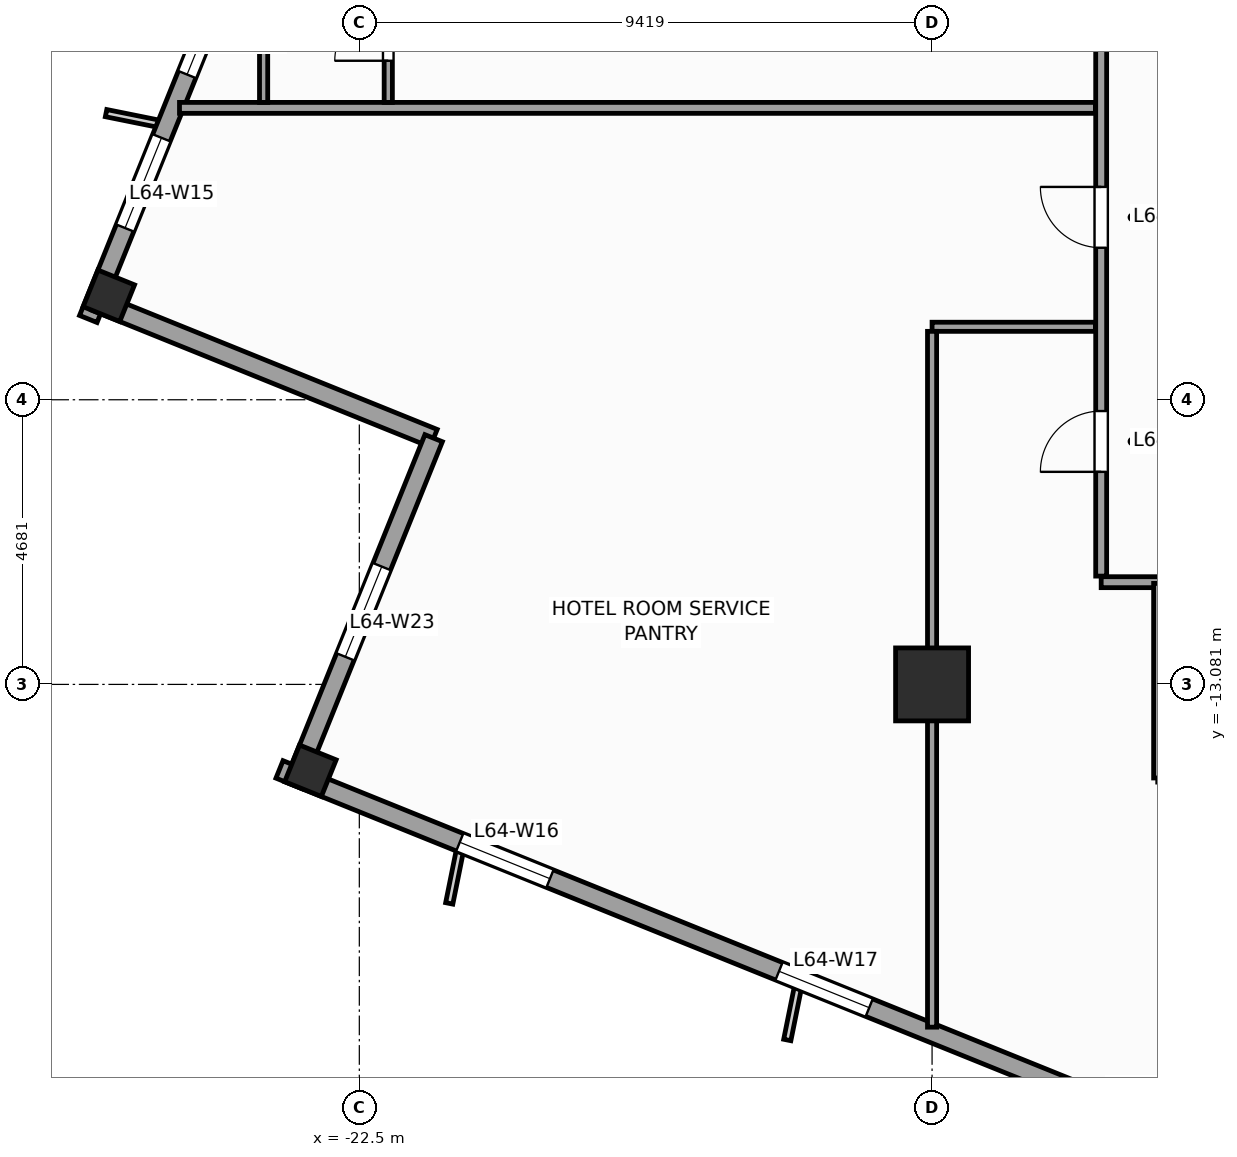
"""IFC4 building model, lengths in metres.
Left out: names, types, materials, properties, quantities, classifications, styles, units other than length and angle.
Written with IfcOpenShell. Run it as: python <this file> out.ifc"""

import sys

from ifc_helpers import new_model, si_unit, direction, frame, frame_2d, origin, origin_2d, place, context, subcontext, project, spatial, rectangle, extrude, source, transform, mapped, element, fill, save


model = new_model("IFC4")
c1 = context("Model", 3, precision=1e-05, world=origin(), true_north=direction((0.0, 1.0)))
c2 = subcontext(c1, "Body", "Model", "MODEL_VIEW")
j1 = project(units=[si_unit("LENGTHUNIT", "METRE"), si_unit("PLANEANGLEUNIT", "RADIAN")], contexts=[c1])
p1 = place(None, origin())
s1 = spatial("IfcSite", under=j1, at=p1, CompositionType="ELEMENT")
p2 = place(p1, origin())
s2 = spatial("IfcBuilding", under=s1, at=p2, CompositionType="ELEMENT")
p3 = place(p2, frame((0.0, 0.0, 265.2)))
s3 = spatial("IfcBuildingStorey", under=s2, at=p3, CompositionType="ELEMENT", Elevation=265.2)
m1 = source(origin(), c2, "Body", "SweptSolid", [
    extrude(rectangle(XDim=1.2, YDim=1.2, at=origin_2d()), origin(), (0.0, 0.0, 1.0), 3.6),
])
p4 = place(p3, frame((-13.081, -13.081, 0.0), z_axis=(0.0, 0.0, 1.0), x_axis=(1.0, 0.0, 0.0)))
e1 = element("IfcColumn", 1, at=p4, inside=s3, PredefinedType="COLUMN", context=c2, shape_type="MappedRepresentation", body=[
    mapped(m1, transform((0.0, 0.0, 0.0), scale=1.0)),
])
m2 = source(origin(), c2, "Body", "SweptSolid", [
    extrude(rectangle(XDim=0.65, YDim=0.65, at=origin_2d()), origin(), (0.0, 0.0, 1.0), 3.6),
])
for number, where, z_axis, x_axis in (
    (2, (-26.62, -6.69, 0.0), (0.0, 0.0, 1.0), (0.375, 0.927, 0.0)),
    (3, (-23.304, -14.501, 0.0), (0.0, 0.0, 1.0), (0.375, 0.927, 0.0)),
):
    element("IfcColumn", number, at=place(p3, frame(where, z_axis=z_axis, x_axis=x_axis)), inside=s3, PredefinedType="COLUMN", context=c2, shape_type="MappedRepresentation", body=[
        mapped(m2, transform((0.0, 0.0, 0.0), scale=1.0)),
    ])
p5 = place(p3, frame((-14.479, 23.813, 0.0), z_axis=(0.0, 0.0, 1.0), x_axis=(-0.374609557019, -0.927182657188, 0.0)))
e4 = element("IfcWall", 4, at=p5, inside=s3, PredefinedType="STANDARD", context=c2, shape_type="SweptSolid", body=[
    extrude(rectangle(XDim=33.31, YDim=0.31, at=frame_2d((16.655, 0.0))), origin(), (0.0, 0.0, 1.0), 2.75),
])
p6 = place(p5, frame((3.197, 0.0, 0.47)))
e5 = element("IfcOpeningElement", 5, at=p6, cuts=e4, PredefinedType="OPENING", context=c2, shape_type="SweptSolid", body=[
    extrude(rectangle(XDim=1.6, YDim=2.1, at=frame_2d((0.8, 1.05))), frame((0.0, 0.165, 0.0), z_axis=(0.0, -1.0, 0.0), x_axis=(1.0, 0.0, 0.0)), (0.0, 0.0, 1.0), 0.33),
])
p7 = place(p5, frame((8.86, 0.0, 0.47)))
e6 = element("IfcOpeningElement", 6, at=p7, cuts=e4, PredefinedType="OPENING", context=c2, shape_type="SweptSolid", body=[
    extrude(rectangle(XDim=1.6, YDim=2.1, at=frame_2d((0.8, 1.05))), frame((0.0, 0.165, 0.0), z_axis=(0.0, -1.0, 0.0), x_axis=(1.0, 0.0, 0.0)), (0.0, 0.0, 1.0), 0.33),
])
p8 = place(p5, frame((14.439, 0.0, 0.47)))
e7 = element("IfcOpeningElement", 7, at=p8, cuts=e4, PredefinedType="OPENING", context=c2, shape_type="SweptSolid", body=[
    extrude(rectangle(XDim=1.6, YDim=2.1, at=frame_2d((0.8, 1.05))), frame((0.0, 0.165, 0.0), z_axis=(0.0, -1.0, 0.0), x_axis=(1.0, 0.0, 0.0)), (0.0, 0.0, 1.0), 0.33),
])
p9 = place(p5, frame((21.851, 0.0, 0.47)))
e8 = element("IfcOpeningElement", 8, at=p9, cuts=e4, PredefinedType="OPENING", context=c2, shape_type="SweptSolid", body=[
    extrude(rectangle(XDim=1.6, YDim=2.1, at=frame_2d((0.8, 1.05))), frame((0.0, 0.165, 0.0), z_axis=(0.0, -1.0, 0.0), x_axis=(1.0, 0.0, 0.0)), (0.0, 0.0, 1.0), 0.33),
])
p10 = place(p5, frame((30.097, 0.0, 0.47)))
e9 = element("IfcOpeningElement", 9, at=p10, cuts=e4, PredefinedType="OPENING", context=c2, shape_type="SweptSolid", body=[
    extrude(rectangle(XDim=1.6, YDim=2.1, at=frame_2d((0.8, 1.05))), frame((0.0, 0.165, 0.0), z_axis=(0.0, -1.0, 0.0), x_axis=(1.0, 0.0, 0.0)), (0.0, 0.0, 1.0), 0.33),
])
p11 = place(p5, frame((27.374, 0.0, 0.47)))
e10 = element("IfcOpeningElement", 10, at=p11, cuts=e4, PredefinedType="OPENING", context=c2, shape_type="SweptSolid", body=[
    extrude(rectangle(XDim=1.6, YDim=2.1, at=frame_2d((0.8, 1.05))), frame((0.0, 0.165, 0.0), z_axis=(0.0, -1.0, 0.0), x_axis=(1.0, 0.0, 0.0)), (0.0, 0.0, 1.0), 0.33),
])
p12 = place(p3, frame((-26.841, -6.784, 0.0), z_axis=(0.0, 0.0, 1.0), x_axis=(0.927171722085, -0.374636620962, 0.0)))
e11 = element("IfcWall", 11, at=p12, inside=s3, PredefinedType="STANDARD", context=c2, shape_type="SweptSolid", body=[
    extrude(rectangle(XDim=6.0, YDim=0.31, at=frame_2d((3.0, 0.0))), origin(), (0.0, 0.0, 1.0), 2.65),
])
p13 = place(p3, frame((-21.278, -9.032, 0.0), z_axis=(0.0, 0.0, 1.0), x_axis=(-0.374602739196, -0.927185411764, 0.0)))
e12 = element("IfcWall", 12, at=p13, inside=s3, PredefinedType="STANDARD", context=c2, shape_type="SweptSolid", body=[
    extrude(rectangle(XDim=6.155, YDim=0.31, at=frame_2d((3.078, 0.0))), origin(), (0.0, 0.0, 1.0), 3.35),
])
p14 = place(p13, frame((2.278, 0.0, 0.47)))
e13 = element("IfcOpeningElement", 13, at=p14, cuts=e12, PredefinedType="OPENING", context=c2, shape_type="SweptSolid", body=[
    extrude(rectangle(XDim=1.6, YDim=2.1, at=frame_2d((0.8, 1.05))), frame((0.0, 0.165, 0.0), z_axis=(0.0, -1.0, 0.0), x_axis=(1.0, 0.0, 0.0)), (0.0, 0.0, 1.0), 0.33),
])
p15 = place(p3, frame((-23.813, -14.479, 0.0), z_axis=(0.0, 0.0, 1.0), x_axis=(0.927182657188, -0.374609557019, 0.0)))
e14 = element("IfcWall", 14, at=p15, inside=s3, PredefinedType="STANDARD", context=c2, shape_type="SweptSolid", body=[
    extrude(rectangle(XDim=33.31, YDim=0.31, at=frame_2d((16.655, 0.0))), origin(), (0.0, 0.0, 1.0), 2.75),
])
p16 = place(p15, frame((22.58, 0.0, 0.0)))
e15 = element("IfcOpeningElement", 15, at=p16, cuts=e14, PredefinedType="OPENING", context=c2, shape_type="SweptSolid", body=[
    extrude(rectangle(XDim=1.05, YDim=2.25, at=frame_2d((0.525, 1.125))), frame((0.0, 0.165, 0.0), z_axis=(0.0, -1.0, 0.0), x_axis=(1.0, 0.0, 0.0)), (0.0, 0.0, 1.0), 0.33),
])
p17 = place(p15, frame((3.197, 0.0, 0.47)))
e16 = element("IfcOpeningElement", 16, at=p17, cuts=e14, PredefinedType="OPENING", context=c2, shape_type="SweptSolid", body=[
    extrude(rectangle(XDim=1.6, YDim=2.1, at=frame_2d((0.8, 1.05))), frame((0.0, 0.165, 0.0), z_axis=(0.0, -1.0, 0.0), x_axis=(1.0, 0.0, 0.0)), (0.0, 0.0, 1.0), 0.33),
])
p18 = place(p15, frame((8.86, 0.0, 0.47)))
e17 = element("IfcOpeningElement", 17, at=p18, cuts=e14, PredefinedType="OPENING", context=c2, shape_type="SweptSolid", body=[
    extrude(rectangle(XDim=1.6, YDim=2.1, at=frame_2d((0.8, 1.05))), frame((0.0, 0.165, 0.0), z_axis=(0.0, -1.0, 0.0), x_axis=(1.0, 0.0, 0.0)), (0.0, 0.0, 1.0), 0.33),
])
p19 = place(p15, frame((14.439, 0.0, 0.47)))
e18 = element("IfcOpeningElement", 18, at=p19, cuts=e14, PredefinedType="OPENING", context=c2, shape_type="SweptSolid", body=[
    extrude(rectangle(XDim=1.6, YDim=2.1, at=frame_2d((0.8, 1.05))), frame((0.0, 0.165, 0.0), z_axis=(0.0, -1.0, 0.0), x_axis=(1.0, 0.0, 0.0)), (0.0, 0.0, 1.0), 0.33),
])
p20 = place(p15, frame((19.601, 0.0, 0.47)))
e19 = element("IfcOpeningElement", 19, at=p20, cuts=e14, PredefinedType="OPENING", context=c2, shape_type="SweptSolid", body=[
    extrude(rectangle(XDim=1.6, YDim=2.1, at=frame_2d((0.8, 1.05))), frame((0.0, 0.165, 0.0), z_axis=(0.0, -1.0, 0.0), x_axis=(1.0, 0.0, 0.0)), (0.0, 0.0, 1.0), 0.33),
])
p21 = place(p15, frame((27.097, 0.0, 0.47)))
e20 = element("IfcOpeningElement", 20, at=p21, cuts=e14, PredefinedType="OPENING", context=c2, shape_type="SweptSolid", body=[
    extrude(rectangle(XDim=1.6, YDim=2.1, at=frame_2d((0.8, 1.05))), frame((0.0, 0.165, 0.0), z_axis=(0.0, -1.0, 0.0), x_axis=(1.0, 0.0, 0.0)), (0.0, 0.0, 1.0), 0.33),
])
p22 = place(p3, frame((-10.3, -11.4, 0.0), z_axis=(0.0, 0.0, 1.0), x_axis=(1.0, 0.0, 0.0)))
e21 = element("IfcWall", 21, at=p22, inside=s3, PredefinedType="PARTITIONING", context=c2, shape_type="SweptSolid", body=[
    extrude(rectangle(XDim=21.7, YDim=0.18, at=frame_2d((10.85, 0.0))), origin(), (0.0, 0.0, 1.0), 3.35),
])
p23 = place(p22, frame((1.605, 0.0, 0.0)))
e22 = element("IfcOpeningElement", 22, at=p23, cuts=e21, PredefinedType="OPENING", context=c2, shape_type="SweptSolid", body=[
    extrude(rectangle(XDim=0.95, YDim=2.1, at=frame_2d((0.475, 1.05))), frame((0.0, 0.1, 0.0), z_axis=(0.0, -1.0, 0.0), x_axis=(1.0, 0.0, 0.0)), (0.0, 0.0, 1.0), 0.2),
])
p24 = place(p22, frame((17.236, 0.0, 0.0)))
e23 = element("IfcOpeningElement", 23, at=p24, cuts=e21, PredefinedType="OPENING", context=c2, shape_type="SweptSolid", body=[
    extrude(rectangle(XDim=1.0, YDim=2.15, at=frame_2d((0.5, 1.075))), frame((0.0, 0.1, 0.0), z_axis=(0.0, -1.0, 0.0), x_axis=(1.0, 0.0, 0.0)), (0.0, 0.0, 1.0), 0.2),
])
p25 = place(p22, frame((9.8, 0.0, 0.0)))
e24 = element("IfcOpeningElement", 24, at=p25, cuts=e21, PredefinedType="OPENING", context=c2, shape_type="SweptSolid", body=[
    extrude(rectangle(XDim=1.0, YDim=2.15, at=frame_2d((0.5, 1.075))), frame((0.0, 0.1, 0.0), z_axis=(0.0, -1.0, 0.0), x_axis=(1.0, 0.0, 0.0)), (0.0, 0.0, 1.0), 0.2),
])
p26 = place(p3, frame((-10.3, -11.3, 0.0), z_axis=(0.0, 0.0, 1.0), x_axis=(0.0, 1.0, 0.0)))
e25 = element("IfcWall", 25, at=p26, inside=s3, PredefinedType="PARTITIONING", context=c2, shape_type="SweptSolid", body=[
    extrude(rectangle(XDim=21.5, YDim=0.18, at=frame_2d((10.75, 0.0))), origin(), (0.0, 0.0, 1.0), 3.35),
])
p27 = place(p26, frame((12.9, 0.0, 0.0)))
e26 = element("IfcOpeningElement", 26, at=p27, cuts=e25, PredefinedType="OPENING", context=c2, shape_type="SweptSolid", body=[
    extrude(rectangle(XDim=1.0, YDim=2.15, at=frame_2d((0.5, 1.075))), frame((0.0, 0.1, 0.0), z_axis=(0.0, -1.0, 0.0), x_axis=(1.0, 0.0, 0.0)), (0.0, 0.0, 1.0), 0.2),
])
p28 = place(p26, frame((17.736, 0.0, 0.0)))
e27 = element("IfcOpeningElement", 27, at=p28, cuts=e25, PredefinedType="OPENING", context=c2, shape_type="SweptSolid", body=[
    extrude(rectangle(XDim=1.0, YDim=2.15, at=frame_2d((0.5, 1.075))), frame((0.0, 0.1, 0.0), z_axis=(0.0, -1.0, 0.0), x_axis=(1.0, 0.0, 0.0)), (0.0, 0.0, 1.0), 0.2),
])
p29 = place(p26, frame((1.714, 0.0, 0.0)))
e28 = element("IfcOpeningElement", 28, at=p29, cuts=e25, PredefinedType="OPENING", context=c2, shape_type="SweptSolid", body=[
    extrude(rectangle(XDim=1.0, YDim=2.15, at=frame_2d((0.5, 1.075))), frame((0.0, 0.1, 0.0), z_axis=(0.0, -1.0, 0.0), x_axis=(1.0, 0.0, 0.0)), (0.0, 0.0, 1.0), 0.2),
])
p30 = place(p26, frame((5.4, 0.0, 0.0)))
e29 = element("IfcOpeningElement", 29, at=p30, cuts=e25, PredefinedType="OPENING", context=c2, shape_type="SweptSolid", body=[
    extrude(rectangle(XDim=1.0, YDim=2.15, at=frame_2d((0.5, 1.075))), frame((0.0, 0.1, 0.0), z_axis=(0.0, -1.0, 0.0), x_axis=(1.0, 0.0, 0.0)), (0.0, 0.0, 1.0), 0.2),
])
p31 = place(p26, frame((9.1, 0.0, 0.0)))
e30 = element("IfcOpeningElement", 30, at=p31, cuts=e25, PredefinedType="OPENING", context=c2, shape_type="SweptSolid", body=[
    extrude(rectangle(XDim=1.0, YDim=2.15, at=frame_2d((0.5, 1.075))), frame((0.0, 0.1, 0.0), z_axis=(0.0, -1.0, 0.0), x_axis=(1.0, 0.0, 0.0)), (0.0, 0.0, 1.0), 0.2),
])
p32 = place(p3, frame((-10.395, -3.6, 0.0), z_axis=(0.0, 0.0, 1.0), x_axis=(-1.0, 0.0, 0.0)))
e31 = element("IfcWall", 31, at=p32, inside=s3, PredefinedType="PARTITIONING", context=c2, shape_type="SweptSolid", body=[
    extrude(rectangle(XDim=15.062, YDim=0.18, at=frame_2d((7.531, 0.0))), origin(), (0.0, 0.0, 1.0), 3.02),
])
p33 = place(p3, frame((-10.395, -7.2, 0.0), z_axis=(0.0, 0.0, 1.0), x_axis=(-1.0, 0.0, 0.0)))
e32 = element("IfcWall", 32, at=p33, inside=s3, PredefinedType="PARTITIONING", context=c2, shape_type="SweptSolid", body=[
    extrude(rectangle(XDim=2.686, YDim=0.15, at=frame_2d((1.343, 0.0))), origin(), (0.0, 0.0, 1.0), 3.35),
])
p34 = place(p3, frame((-13.081, -7.275, 0.0), z_axis=(0.0, 0.0, 1.0), x_axis=(0.0, -1.0, 0.0)))
e33 = element("IfcWall", 33, at=p34, inside=s3, PredefinedType="PARTITIONING", context=c2, shape_type="SweptSolid", body=[
    extrude(rectangle(XDim=11.443, YDim=0.15, at=frame_2d((5.721, 0.0))), origin(), (0.0, 0.0, 1.0), 2.45),
])
p35 = place(p3, frame((-9.37, -14.62, 0.0), z_axis=(0.0, 0.0, 1.0), x_axis=(0.0, 1.0, 0.0)))
e34 = element("IfcWall", 34, at=p35, inside=s3, PredefinedType="PARTITIONING", context=c2, shape_type="SweptSolid", body=[
    extrude(rectangle(XDim=3.2, YDim=0.135, at=frame_2d((1.6, 0.0))), origin(), (0.0, 0.0, 1.0), 3.35),
])
p36 = place(p3, frame((-22.024, -3.51, 0.0), z_axis=(0.0, 0.0, 1.0), x_axis=(0.0, 1.0, 0.0)))
e35 = element("IfcWall", 35, at=p36, inside=s3, PredefinedType="PARTITIONING", context=c2, shape_type="SweptSolid", body=[
    extrude(rectangle(XDim=2.25, YDim=0.135, at=frame_2d((1.125, 0.0))), origin(), (0.0, 0.0, 1.0), 3.35),
])
p37 = place(p36, frame((0.685, 0.0, 0.0)))
e36 = element("IfcOpeningElement", 36, at=p37, cuts=e35, PredefinedType="OPENING", context=c2, shape_type="SweptSolid", body=[
    extrude(rectangle(XDim=0.88, YDim=2.1, at=frame_2d((0.44, 1.05))), frame((0.0, 0.078, 0.0), z_axis=(0.0, -1.0, 0.0), x_axis=(1.0, 0.0, 0.0)), (0.0, 0.0, 1.0), 0.155),
])
p38 = place(p3, frame((-24.074, -3.51, 0.0), z_axis=(0.0, 0.0, 1.0), x_axis=(0.0, 1.0, 0.0)))
e37 = element("IfcWall", 37, at=p38, inside=s3, PredefinedType="PARTITIONING", context=c2, shape_type="SweptSolid", body=[
    extrude(rectangle(XDim=2.25, YDim=0.135, at=frame_2d((1.125, 0.0))), origin(), (0.0, 0.0, 1.0), 3.35),
])
m3 = source(origin(), c2, "Body", "SweptSolid", [
    extrude(rectangle(XDim=1.6, YDim=2.1, at=frame_2d((0.8, 1.05))), frame((0.0, 0.03, 0.0), z_axis=(0.0, -1.0, 0.0), x_axis=(1.0, 0.0, 0.0)), (0.0, 0.0, 1.0), 0.06),
])
p39 = place(p10, origin())
e38 = element("IfcWindow", 38, at=p39, inside=s3, PartitioningType="SINGLE_PANEL", PredefinedType="WINDOW", context=c2, shape_type="MappedRepresentation", body=[
    mapped(m3, transform((0.0, 0.0, 0.0), scale=1.0)),
])
fill(e9, e38)
p40 = place(p17, origin())
e39 = element("IfcWindow", 39, at=p40, inside=s3, PartitioningType="SINGLE_PANEL", PredefinedType="WINDOW", context=c2, shape_type="MappedRepresentation", body=[
    mapped(m3, transform((0.0, 0.0, 0.0), scale=1.0)),
])
fill(e16, e39)
p41 = place(p18, origin())
e40 = element("IfcWindow", 40, at=p41, inside=s3, PartitioningType="SINGLE_PANEL", PredefinedType="WINDOW", context=c2, shape_type="MappedRepresentation", body=[
    mapped(m3, transform((0.0, 0.0, 0.0), scale=1.0)),
])
fill(e17, e40)
p42 = place(p14, origin())
e41 = element("IfcWindow", 41, at=p42, inside=s3, PartitioningType="SINGLE_PANEL", PredefinedType="WINDOW", context=c2, shape_type="MappedRepresentation", body=[
    mapped(m3, transform((0.0, 0.0, 0.0), scale=1.0)),
])
fill(e13, e41)
m4 = source(origin(), c2, "Body", "SweptSolid", [
    extrude(rectangle(XDim=1.0, YDim=2.15, at=frame_2d((0.5, 1.075))), frame((0.0, 0.025, 0.0), z_axis=(0.0, -1.0, 0.0), x_axis=(1.0, 0.0, 0.0)), (0.0, 0.0, 1.0), 0.05),
])
p43 = place(p29, origin())
e42 = element("IfcDoor", 42, at=p43, inside=s3, OperationType="SINGLE_SWING_LEFT", PredefinedType="DOOR", context=c2, shape_type="MappedRepresentation", body=[
    mapped(m4, transform((0.0, 0.0, 0.0), scale=1.0)),
])
fill(e28, e42)
p44 = place(p30, origin())
e43 = element("IfcDoor", 43, at=p44, inside=s3, OperationType="SINGLE_SWING_RIGHT", PredefinedType="DOOR", context=c2, shape_type="MappedRepresentation", body=[
    mapped(m4, transform((0.0, 0.0, 0.0), scale=1.0)),
])
fill(e29, e43)
m5 = source(origin(), c2, "Body", "SweptSolid", [
    extrude(rectangle(XDim=0.88, YDim=2.1, at=frame_2d((0.44, 1.05))), frame((0.0, 0.025, 0.0), z_axis=(0.0, -1.0, 0.0), x_axis=(1.0, 0.0, 0.0)), (0.0, 0.0, 1.0), 0.05),
])
p45 = place(p37, origin())
e44 = element("IfcDoor", 44, at=p45, inside=s3, OperationType="SINGLE_SWING_LEFT", PredefinedType="DOOR", context=c2, shape_type="MappedRepresentation", body=[
    mapped(m5, transform((0.0, 0.0, 0.0), scale=1.0)),
])
fill(e36, e44)
p46 = place(p11, origin())
e45 = element("IfcWindow", 45, at=p46, inside=s3, PartitioningType="SINGLE_PANEL", PredefinedType="WINDOW", context=c2, shape_type="MappedRepresentation", body=[
    mapped(m3, transform((0.0, 0.0, 0.0), scale=1.0)),
])
fill(e10, e45)
save(model, sys.argv[1])
